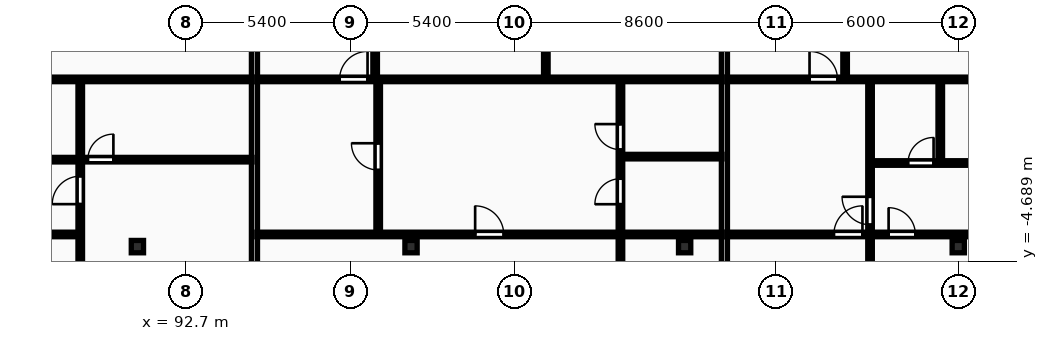
"""IFC4 building model, lengths in metres.
Left out: names, types, materials, properties, quantities, classifications, styles, units other than length and angle.
Written with IfcOpenShell. Run it as: python <this file> out.ifc"""

import sys

from ifc_helpers import new_model, si_unit, direction, frame, frame_2d, origin, origin_2d, place, context, subcontext, project, spatial, rectangle, i_section, extrude, element, fill, save


model = new_model("IFC4")
c1 = context("Model", 3, precision=1e-05, world=origin(), true_north=direction((0.0, 1.0)))
c2 = subcontext(c1, "Body", "Model", "MODEL_VIEW")
j1 = project(units=[si_unit("LENGTHUNIT", "METRE"), si_unit("PLANEANGLEUNIT", "RADIAN")], contexts=[c1])
p1 = place(None, origin())
s1 = spatial("IfcSite", under=j1, at=p1, CompositionType="ELEMENT")
p2 = place(p1, origin())
s2 = spatial("IfcBuilding", under=s1, at=p2, CompositionType="ELEMENT")
p3 = place(p2, frame((0.0, 0.0, 139.3)))
s3 = spatial("IfcBuildingStorey", under=s2, at=p3, CompositionType="ELEMENT", Elevation=139.3)
for number, where, z_axis, x_axis in (
    (1, (91.1, -4.2, 0.0), (0.0, 0.0, 1.0), (1.0, 0.0, 0.0)),
    (2, (100.1, -4.2, 0.0), (0.0, 0.0, 1.0), (1.0, 0.0, 0.0)),
    (3, (109.1, -4.2, 0.0), (0.0, 0.0, 1.0), (1.0, 0.0, 0.0)),
    (4, (118.1, -4.2, 0.0), (0.0, 0.0, 1.0), (1.0, 0.0, 0.0)),
):
    element("IfcColumn", number, at=place(p3, frame(where, z_axis=z_axis, x_axis=x_axis)), inside=s3, PredefinedType="COLUMN", context=c2, shape_type="SweptSolid", body=[
        extrude(i_section(OverallWidth=0.403, OverallDepth=0.406, WebThickness=0.027, FlangeThickness=0.043, FilletRadius=0.015, at=origin_2d()), origin(), (0.0, 0.0, 1.0), 3.6),
    ])
p4 = place(p3, frame((94.95, -8.7, 0.0), z_axis=(0.0, 0.0, 1.0), x_axis=(0.0, 1.0, 0.0)))
e5 = element("IfcWall", 5, at=p4, inside=s3, PredefinedType="PARTITIONING", context=c2, shape_type="SweptSolid", body=[
    extrude(rectangle(XDim=24.57, YDim=0.2, at=frame_2d((12.285, 0.0))), origin(), (0.0, 0.0, 1.0), 3.31),
])
p5 = place(p3, frame((89.22, -1.32, 0.0), z_axis=(0.0, 0.0, 1.0), x_axis=(0.0, 1.0, 0.0)))
e6 = element("IfcWall", 6, at=p5, inside=s3, PredefinedType="PARTITIONING", context=c2, shape_type="SweptSolid", body=[
    extrude(rectangle(XDim=2.58, YDim=0.15, at=frame_2d((1.29, 0.0))), origin(), (0.0, 0.0, 1.0), 3.31),
])
p6 = place(p3, frame((89.22, -8.7, 0.0), z_axis=(0.0, 0.0, 1.0), x_axis=(0.0, 1.0, 0.0)))
e7 = element("IfcWall", 7, at=p6, inside=s3, PredefinedType="PARTITIONING", context=c2, shape_type="SweptSolid", body=[
    extrude(rectangle(XDim=7.34, YDim=0.15, at=frame_2d((3.67, 0.0))), origin(), (0.0, 0.0, 1.0), 3.31),
])
p7 = place(p6, frame((5.897, 0.0, 0.0)))
e8 = element("IfcOpeningElement", 8, at=p7, cuts=e7, PredefinedType="OPENING", context=c2, shape_type="SweptSolid", body=[
    extrude(rectangle(XDim=0.92, YDim=2.08, at=frame_2d((0.46, 1.04))), frame((0.0, 0.085, 0.0), z_axis=(0.0, -1.0, 0.0), x_axis=(1.0, 0.0, 0.0)), (0.0, 0.0, 1.0), 0.17),
])
p8 = place(p3, frame((77.11, -1.34, 0.0), z_axis=(0.0, 0.0, 1.0), x_axis=(1.0, 0.0, 0.0)))
e9 = element("IfcWall", 9, at=p8, inside=s3, PredefinedType="PARTITIONING", context=c2, shape_type="SweptSolid", body=[
    extrude(rectangle(XDim=17.76, YDim=0.15, at=frame_2d((8.88, 0.0))), origin(), (0.0, 0.0, 1.0), 3.31),
])
p9 = place(p8, frame((1.191, 0.0, 0.0)))
e10 = element("IfcOpeningElement", 10, at=p9, cuts=e9, PredefinedType="OPENING", context=c2, shape_type="SweptSolid", body=[
    extrude(rectangle(XDim=0.84, YDim=2.04, at=frame_2d((0.42, 1.02))), frame((0.0, 0.085, 0.0), z_axis=(0.0, -1.0, 0.0), x_axis=(1.0, 0.0, 0.0)), (0.0, 0.0, 1.0), 0.17),
])
p10 = place(p8, frame((8.46, 0.0, 0.0)))
e11 = element("IfcOpeningElement", 11, at=p10, cuts=e9, PredefinedType="OPENING", context=c2, shape_type="SweptSolid", body=[
    extrude(rectangle(XDim=0.84, YDim=2.04, at=frame_2d((0.42, 1.02))), frame((0.0, 0.085, 0.0), z_axis=(0.0, -1.0, 0.0), x_axis=(1.0, 0.0, 0.0)), (0.0, 0.0, 1.0), 0.17),
])
p11 = place(p8, frame((12.36, 0.0, 0.0)))
e12 = element("IfcOpeningElement", 12, at=p11, cuts=e9, PredefinedType="OPENING", context=c2, shape_type="SweptSolid", body=[
    extrude(rectangle(XDim=0.84, YDim=2.04, at=frame_2d((0.42, 1.02))), frame((0.0, 0.085, 0.0), z_axis=(0.0, -1.0, 0.0), x_axis=(1.0, 0.0, 0.0)), (0.0, 0.0, 1.0), 0.17),
])
p12 = place(p3, frame((72.78, 1.3, 0.0), z_axis=(0.0, 0.0, 1.0), x_axis=(1.0, 0.0, 0.0)))
e13 = element("IfcWall", 13, at=p12, inside=s3, PredefinedType="PARTITIONING", context=c2, shape_type="SweptSolid", body=[
    extrude(rectangle(XDim=22.09, YDim=0.15, at=frame_2d((11.045, 0.0))), origin(), (0.0, 0.0, 1.0), 3.31),
])
p13 = place(p12, frame((2.72, 0.0, 0.0)))
e14 = element("IfcOpeningElement", 14, at=p13, cuts=e13, PredefinedType="OPENING", context=c2, shape_type="SweptSolid", body=[
    extrude(rectangle(XDim=0.92, YDim=2.08, at=frame_2d((0.46, 1.04))), frame((0.0, 0.085, 0.0), z_axis=(0.0, -1.0, 0.0), x_axis=(1.0, 0.0, 0.0)), (0.0, 0.0, 1.0), 0.17),
])
p14 = place(p3, frame((72.78, -3.8, 0.0), z_axis=(0.0, 0.0, 1.0), x_axis=(1.0, 0.0, 0.0)))
e15 = element("IfcWall", 15, at=p14, inside=s3, PredefinedType="PARTITIONING", context=c2, shape_type="SweptSolid", body=[
    extrude(rectangle(XDim=16.44, YDim=0.15, at=frame_2d((8.22, 0.0))), origin(), (0.0, 0.0, 1.0), 3.31),
])
p15 = place(p14, frame((3.1, 0.0, 0.0)))
e16 = element("IfcOpeningElement", 16, at=p15, cuts=e15, PredefinedType="OPENING", context=c2, shape_type="SweptSolid", body=[
    extrude(rectangle(XDim=0.94, YDim=2.1, at=frame_2d((0.47, 1.05))), frame((0.0, 0.085, 0.0), z_axis=(0.0, -1.0, 0.0), x_axis=(1.0, 0.0, 0.0)), (0.0, 0.0, 1.0), 0.17),
])
p16 = place(p14, frame((6.969, 0.0, 0.0)))
e17 = element("IfcOpeningElement", 17, at=p16, cuts=e15, PredefinedType="OPENING", context=c2, shape_type="SweptSolid", body=[
    extrude(rectangle(XDim=0.88, YDim=2.06, at=frame_2d((0.44, 1.03))), frame((0.0, 0.085, 0.0), z_axis=(0.0, -1.0, 0.0), x_axis=(1.0, 0.0, 0.0)), (0.0, 0.0, 1.0), 0.17),
])
p17 = place(p14, frame((11.498, 0.0, 0.0)))
e18 = element("IfcOpeningElement", 18, at=p17, cuts=e15, PredefinedType="OPENING", context=c2, shape_type="SweptSolid", body=[
    extrude(rectangle(XDim=0.88, YDim=2.06, at=frame_2d((0.44, 1.03))), frame((0.0, 0.085, 0.0), z_axis=(0.0, -1.0, 0.0), x_axis=(1.0, 0.0, 0.0)), (0.0, 0.0, 1.0), 0.17),
])
p18 = place(p3, frame((110.408, -8.7, 0.0), z_axis=(0.0, 0.0, 1.0), x_axis=(0.0, 1.0, 0.0)))
e19 = element("IfcWall", 19, at=p18, inside=s3, PredefinedType="PARTITIONING", context=c2, shape_type="SweptSolid", body=[
    extrude(rectangle(XDim=24.57, YDim=0.2, at=frame_2d((12.285, 0.0))), origin(), (0.0, 0.0, 1.0), 3.31),
])
p19 = place(p3, frame((104.534, 1.34, 0.0), z_axis=(0.0, 0.0, 1.0), x_axis=(0.0, 1.0, 0.0)))
e20 = element("IfcWall", 20, at=p19, inside=s3, PredefinedType="PARTITIONING", context=c2, shape_type="SweptSolid", body=[
    extrude(rectangle(XDim=7.455, YDim=0.15, at=frame_2d((3.728, 0.0))), origin(), (0.0, 0.0, 1.0), 3.31),
])
p20 = place(p19, frame((3.308, 0.0, 0.0)))
e21 = element("IfcOpeningElement", 21, at=p20, cuts=e20, PredefinedType="OPENING", context=c2, shape_type="SweptSolid", body=[
    extrude(rectangle(XDim=0.84, YDim=2.04, at=frame_2d((0.42, 1.02))), frame((0.0, 0.085, 0.0), z_axis=(0.0, -1.0, 0.0), x_axis=(1.0, 0.0, 0.0)), (0.0, 0.0, 1.0), 0.17),
])
p21 = place(p3, frame((98.92, 1.34, 0.0), z_axis=(0.0, 0.0, 1.0), x_axis=(0.0, 1.0, 0.0)))
e22 = element("IfcWall", 22, at=p21, inside=s3, PredefinedType="PARTITIONING", context=c2, shape_type="SweptSolid", body=[
    extrude(rectangle(XDim=14.55, YDim=0.15, at=frame_2d((7.275, 0.0))), origin(), (0.0, 0.0, 1.0), 3.31),
])
p22 = place(p21, frame((3.098, 0.0, 0.0)))
e23 = element("IfcOpeningElement", 23, at=p22, cuts=e22, PredefinedType="OPENING", context=c2, shape_type="SweptSolid", body=[
    extrude(rectangle(XDim=0.88, YDim=2.06, at=frame_2d((0.44, 1.03))), frame((0.0, 0.085, 0.0), z_axis=(0.0, -1.0, 0.0), x_axis=(1.0, 0.0, 0.0)), (0.0, 0.0, 1.0), 0.17),
])
p23 = place(p3, frame((99.02, -3.74, 0.0), z_axis=(0.0, 0.0, 1.0), x_axis=(0.0, 1.0, 0.0)))
e24 = element("IfcWall", 24, at=p23, inside=s3, PredefinedType="PARTITIONING", context=c2, shape_type="SweptSolid", body=[
    extrude(rectangle(XDim=5.0, YDim=0.15, at=frame_2d((2.5, 0.0))), origin(), (0.0, 0.0, 1.0), 3.31),
])
p24 = place(p23, frame((2.06, 0.0, 0.0)))
e25 = element("IfcOpeningElement", 25, at=p24, cuts=e24, PredefinedType="OPENING", context=c2, shape_type="SweptSolid", body=[
    extrude(rectangle(XDim=0.88, YDim=2.06, at=frame_2d((0.44, 1.03))), frame((0.0, 0.085, 0.0), z_axis=(0.0, -1.0, 0.0), x_axis=(1.0, 0.0, 0.0)), (0.0, 0.0, 1.0), 0.17),
])
p25 = place(p3, frame((107.048, -1.24, 0.0), z_axis=(0.0, 0.0, 1.0), x_axis=(1.0, 0.0, 0.0)))
e26 = element("IfcWall", 26, at=p25, inside=s3, PredefinedType="PARTITIONING", context=c2, shape_type="SweptSolid", body=[
    extrude(rectangle(XDim=3.28, YDim=0.15, at=frame_2d((1.64, 0.0))), origin(), (0.0, 0.0, 1.0), 3.31),
])
p26 = place(p3, frame((106.988, -8.7, 0.0), z_axis=(0.0, 0.0, 1.0), x_axis=(0.0, 1.0, 0.0)))
e27 = element("IfcWall", 27, at=p26, inside=s3, PredefinedType="PARTITIONING", context=c2, shape_type="SweptSolid", body=[
    extrude(rectangle(XDim=9.96, YDim=0.15, at=frame_2d((4.98, 0.0))), origin(), (0.0, 0.0, 1.0), 3.31),
])
p27 = place(p26, frame((5.894, 0.0, 0.0)))
e28 = element("IfcOpeningElement", 28, at=p27, cuts=e27, PredefinedType="OPENING", context=c2, shape_type="SweptSolid", body=[
    extrude(rectangle(XDim=0.84, YDim=2.04, at=frame_2d((0.42, 1.02))), frame((0.0, 0.085, 0.0), z_axis=(0.0, -1.0, 0.0), x_axis=(1.0, 0.0, 0.0)), (0.0, 0.0, 1.0), 0.17),
])
p28 = place(p26, frame((7.69, 0.0, 0.0)))
e29 = element("IfcOpeningElement", 29, at=p28, cuts=e27, PredefinedType="OPENING", context=c2, shape_type="SweptSolid", body=[
    extrude(rectangle(XDim=0.84, YDim=2.04, at=frame_2d((0.42, 1.02))), frame((0.0, 0.085, 0.0), z_axis=(0.0, -1.0, 0.0), x_axis=(1.0, 0.0, 0.0)), (0.0, 0.0, 1.0), 0.17),
])
p29 = place(p26, frame((2.223, 0.0, 0.0)))
e30 = element("IfcOpeningElement", 30, at=p29, cuts=e27, PredefinedType="OPENING", context=c2, shape_type="SweptSolid", body=[
    extrude(rectangle(XDim=0.88, YDim=2.06, at=frame_2d((0.44, 1.03))), frame((0.0, 0.085, 0.0), z_axis=(0.0, -1.0, 0.0), x_axis=(1.0, 0.0, 0.0)), (0.0, 0.0, 1.0), 0.17),
])
p30 = place(p3, frame((95.03, 1.3, 0.0), z_axis=(0.0, 0.0, 1.0), x_axis=(1.0, 0.0, 0.0)))
e31 = element("IfcWall", 31, at=p30, inside=s3, PredefinedType="PARTITIONING", context=c2, shape_type="SweptSolid", body=[
    extrude(rectangle(XDim=15.298, YDim=0.15, at=frame_2d((7.649, 0.0))), origin(), (0.0, 0.0, 1.0), 3.31),
])
p31 = place(p30, frame((2.72, 0.0, 0.0)))
e32 = element("IfcOpeningElement", 32, at=p31, cuts=e31, PredefinedType="OPENING", context=c2, shape_type="SweptSolid", body=[
    extrude(rectangle(XDim=0.92, YDim=2.08, at=frame_2d((0.46, 1.04))), frame((0.0, 0.085, 0.0), z_axis=(0.0, -1.0, 0.0), x_axis=(1.0, 0.0, 0.0)), (0.0, 0.0, 1.0), 0.17),
])
p32 = place(p3, frame((95.03, -3.8, 0.0), z_axis=(0.0, 0.0, 1.0), x_axis=(1.0, 0.0, 0.0)))
e33 = element("IfcWall", 33, at=p32, inside=s3, PredefinedType="PARTITIONING", context=c2, shape_type="SweptSolid", body=[
    extrude(rectangle(XDim=15.298, YDim=0.15, at=frame_2d((7.649, 0.0))), origin(), (0.0, 0.0, 1.0), 3.31),
])
p33 = place(p32, frame((7.179, 0.0, 0.0)))
e34 = element("IfcOpeningElement", 34, at=p33, cuts=e33, PredefinedType="OPENING", context=c2, shape_type="SweptSolid", body=[
    extrude(rectangle(XDim=0.94, YDim=2.1, at=frame_2d((0.47, 1.05))), frame((0.0, 0.085, 0.0), z_axis=(0.0, -1.0, 0.0), x_axis=(1.0, 0.0, 0.0)), (0.0, 0.0, 1.0), 0.17),
])
p34 = place(p3, frame((114.378, 1.34, 0.0), z_axis=(0.0, 0.0, 1.0), x_axis=(0.0, 1.0, 0.0)))
e35 = element("IfcWall", 35, at=p34, inside=s3, PredefinedType="PARTITIONING", context=c2, shape_type="SweptSolid", body=[
    extrude(rectangle(XDim=14.55, YDim=0.15, at=frame_2d((7.275, 0.0))), origin(), (0.0, 0.0, 1.0), 3.31),
])
p35 = place(p34, frame((5.965, 0.0, 0.0)))
e36 = element("IfcOpeningElement", 36, at=p35, cuts=e35, PredefinedType="OPENING", context=c2, shape_type="SweptSolid", body=[
    extrude(rectangle(XDim=0.88, YDim=2.06, at=frame_2d((0.44, 1.03))), frame((0.0, 0.085, 0.0), z_axis=(0.0, -1.0, 0.0), x_axis=(1.0, 0.0, 0.0)), (0.0, 0.0, 1.0), 0.17),
])
p36 = place(p3, frame((117.508, -1.43, 0.0), z_axis=(0.0, 0.0, 1.0), x_axis=(0.0, 1.0, 0.0)))
e37 = element("IfcWall", 37, at=p36, inside=s3, PredefinedType="PARTITIONING", context=c2, shape_type="SweptSolid", body=[
    extrude(rectangle(XDim=2.69, YDim=0.15, at=frame_2d((1.345, 0.0))), origin(), (0.0, 0.0, 1.0), 3.31),
])
p37 = place(p3, frame((115.198, -8.7, 0.0), z_axis=(0.0, 0.0, 1.0), x_axis=(0.0, 1.0, 0.0)))
e38 = element("IfcWall", 38, at=p37, inside=s3, PredefinedType="PARTITIONING", context=c2, shape_type="SweptSolid", body=[
    extrude(rectangle(XDim=9.96, YDim=0.15, at=frame_2d((4.98, 0.0))), origin(), (0.0, 0.0, 1.0), 3.31),
])
p38 = place(p37, frame((5.22, 0.0, 0.0)))
e39 = element("IfcOpeningElement", 39, at=p38, cuts=e38, PredefinedType="OPENING", context=c2, shape_type="SweptSolid", body=[
    extrude(rectangle(XDim=0.92, YDim=2.08, at=frame_2d((0.46, 1.04))), frame((0.0, 0.085, 0.0), z_axis=(0.0, -1.0, 0.0), x_axis=(1.0, 0.0, 0.0)), (0.0, 0.0, 1.0), 0.17),
])
p39 = place(p3, frame((115.238, -1.45, 0.0), z_axis=(0.0, 0.0, 1.0), x_axis=(1.0, 0.0, 0.0)))
e40 = element("IfcWall", 40, at=p39, inside=s3, PredefinedType="PARTITIONING", context=c2, shape_type="SweptSolid", body=[
    extrude(rectangle(XDim=15.382, YDim=0.15, at=frame_2d((7.691, 0.0))), origin(), (0.0, 0.0, 1.0), 3.31),
])
p40 = place(p39, frame((1.21, 0.0, 0.0)))
e41 = element("IfcOpeningElement", 41, at=p40, cuts=e40, PredefinedType="OPENING", context=c2, shape_type="SweptSolid", body=[
    extrude(rectangle(XDim=0.84, YDim=2.04, at=frame_2d((0.42, 1.02))), frame((0.0, 0.085, 0.0), z_axis=(0.0, -1.0, 0.0), x_axis=(1.0, 0.0, 0.0)), (0.0, 0.0, 1.0), 0.17),
])
p41 = place(p39, frame((7.271, 0.0, 0.0)))
e42 = element("IfcOpeningElement", 42, at=p41, cuts=e40, PredefinedType="OPENING", context=c2, shape_type="SweptSolid", body=[
    extrude(rectangle(XDim=0.84, YDim=2.04, at=frame_2d((0.42, 1.02))), frame((0.0, 0.085, 0.0), z_axis=(0.0, -1.0, 0.0), x_axis=(1.0, 0.0, 0.0)), (0.0, 0.0, 1.0), 0.17),
])
p42 = place(p39, frame((11.162, 0.0, 0.0)))
e43 = element("IfcOpeningElement", 43, at=p42, cuts=e40, PredefinedType="OPENING", context=c2, shape_type="SweptSolid", body=[
    extrude(rectangle(XDim=0.84, YDim=2.04, at=frame_2d((0.42, 1.02))), frame((0.0, 0.085, 0.0), z_axis=(0.0, -1.0, 0.0), x_axis=(1.0, 0.0, 0.0)), (0.0, 0.0, 1.0), 0.17),
])
p43 = place(p3, frame((110.488, 1.3, 0.0), z_axis=(0.0, 0.0, 1.0), x_axis=(1.0, 0.0, 0.0)))
e44 = element("IfcWall", 44, at=p43, inside=s3, PredefinedType="PARTITIONING", context=c2, shape_type="SweptSolid", body=[
    extrude(rectangle(XDim=20.132, YDim=0.15, at=frame_2d((10.066, 0.0))), origin(), (0.0, 0.0, 1.0), 3.31),
])
p44 = place(p43, frame((2.72, 0.0, 0.0)))
e45 = element("IfcOpeningElement", 45, at=p44, cuts=e44, PredefinedType="OPENING", context=c2, shape_type="SweptSolid", body=[
    extrude(rectangle(XDim=0.92, YDim=2.08, at=frame_2d((0.46, 1.04))), frame((0.0, 0.085, 0.0), z_axis=(0.0, -1.0, 0.0), x_axis=(1.0, 0.0, 0.0)), (0.0, 0.0, 1.0), 0.17),
])
p45 = place(p3, frame((110.488, -3.8, 0.0), z_axis=(0.0, 0.0, 1.0), x_axis=(1.0, 0.0, 0.0)))
e46 = element("IfcWall", 46, at=p45, inside=s3, PredefinedType="PARTITIONING", context=c2, shape_type="SweptSolid", body=[
    extrude(rectangle(XDim=15.662, YDim=0.15, at=frame_2d((7.831, 0.0))), origin(), (0.0, 0.0, 1.0), 3.31),
])
p46 = place(p45, frame((3.52, 0.0, 0.0)))
e47 = element("IfcOpeningElement", 47, at=p46, cuts=e46, PredefinedType="OPENING", context=c2, shape_type="SweptSolid", body=[
    extrude(rectangle(XDim=0.94, YDim=2.1, at=frame_2d((0.47, 1.05))), frame((0.0, 0.085, 0.0), z_axis=(0.0, -1.0, 0.0), x_axis=(1.0, 0.0, 0.0)), (0.0, 0.0, 1.0), 0.17),
])
p47 = place(p45, frame((5.321, 0.0, 0.0)))
e48 = element("IfcOpeningElement", 48, at=p47, cuts=e46, PredefinedType="OPENING", context=c2, shape_type="SweptSolid", body=[
    extrude(rectangle(XDim=0.88, YDim=2.06, at=frame_2d((0.44, 1.03))), frame((0.0, 0.085, 0.0), z_axis=(0.0, -1.0, 0.0), x_axis=(1.0, 0.0, 0.0)), (0.0, 0.0, 1.0), 0.17),
])
p48 = place(p45, frame((10.244, 0.0, 0.0)))
e49 = element("IfcOpeningElement", 49, at=p48, cuts=e46, PredefinedType="OPENING", context=c2, shape_type="SweptSolid", body=[
    extrude(rectangle(XDim=0.88, YDim=2.06, at=frame_2d((0.44, 1.03))), frame((0.0, 0.085, 0.0), z_axis=(0.0, -1.0, 0.0), x_axis=(1.0, 0.0, 0.0)), (0.0, 0.0, 1.0), 0.17),
])
p49 = place(p7, origin())
e50 = element("IfcDoor", 50, at=p49, inside=s3, OperationType="SINGLE_SWING_LEFT", PredefinedType="DOOR", context=c2, shape_type="SweptSolid", body=[
    extrude(rectangle(XDim=0.92, YDim=2.08, at=frame_2d((0.46, 1.04))), frame((0.0, 0.025, 0.0), z_axis=(0.0, -1.0, 0.0), x_axis=(1.0, 0.0, 0.0)), (0.0, 0.0, 1.0), 0.05),
])
fill(e8, e50)
p50 = place(p11, origin())
e51 = element("IfcDoor", 51, at=p50, inside=s3, OperationType="SINGLE_SWING_RIGHT", PredefinedType="DOOR", context=c2, shape_type="SweptSolid", body=[
    extrude(rectangle(XDim=0.84, YDim=2.04, at=frame_2d((0.42, 1.02))), frame((0.0, 0.025, 0.0), z_axis=(0.0, -1.0, 0.0), x_axis=(1.0, 0.0, 0.0)), (0.0, 0.0, 1.0), 0.05),
])
fill(e12, e51)
p51 = place(p24, origin())
e52 = element("IfcDoor", 52, at=p51, inside=s3, OperationType="SINGLE_SWING_RIGHT", PredefinedType="DOOR", context=c2, shape_type="SweptSolid", body=[
    extrude(rectangle(XDim=0.88, YDim=2.06, at=frame_2d((0.44, 1.03))), frame((0.0, 0.025, 0.0), z_axis=(0.0, -1.0, 0.0), x_axis=(1.0, 0.0, 0.0)), (0.0, 0.0, 1.0), 0.05),
])
fill(e25, e52)
p52 = place(p27, origin())
e53 = element("IfcDoor", 53, at=p52, inside=s3, OperationType="SINGLE_SWING_LEFT", PredefinedType="DOOR", context=c2, shape_type="SweptSolid", body=[
    extrude(rectangle(XDim=0.84, YDim=2.04, at=frame_2d((0.42, 1.02))), frame((0.0, 0.025, 0.0), z_axis=(0.0, -1.0, 0.0), x_axis=(1.0, 0.0, 0.0)), (0.0, 0.0, 1.0), 0.05),
])
fill(e28, e53)
p53 = place(p28, origin())
e54 = element("IfcDoor", 54, at=p53, inside=s3, OperationType="SINGLE_SWING_RIGHT", PredefinedType="DOOR", context=c2, shape_type="SweptSolid", body=[
    extrude(rectangle(XDim=0.84, YDim=2.04, at=frame_2d((0.42, 1.02))), frame((0.0, 0.025, 0.0), z_axis=(0.0, -1.0, 0.0), x_axis=(1.0, 0.0, 0.0)), (0.0, 0.0, 1.0), 0.05),
])
fill(e29, e54)
p54 = place(p31, origin())
e55 = element("IfcDoor", 55, at=p54, inside=s3, OperationType="SINGLE_SWING_RIGHT", PredefinedType="DOOR", context=c2, shape_type="SweptSolid", body=[
    extrude(rectangle(XDim=0.92, YDim=2.08, at=frame_2d((0.46, 1.04))), frame((0.0, 0.025, 0.0), z_axis=(0.0, -1.0, 0.0), x_axis=(1.0, 0.0, 0.0)), (0.0, 0.0, 1.0), 0.05),
])
fill(e32, e55)
p55 = place(p33, origin())
e56 = element("IfcDoor", 56, at=p55, inside=s3, OperationType="SINGLE_SWING_LEFT", PredefinedType="DOOR", context=c2, shape_type="SweptSolid", body=[
    extrude(rectangle(XDim=0.94, YDim=2.1, at=frame_2d((0.47, 1.05))), frame((0.0, 0.025, 0.0), z_axis=(0.0, -1.0, 0.0), x_axis=(1.0, 0.0, 0.0)), (0.0, 0.0, 1.0), 0.05),
])
fill(e34, e56)
p56 = place(p38, origin())
e57 = element("IfcDoor", 57, at=p56, inside=s3, OperationType="SINGLE_SWING_RIGHT", PredefinedType="DOOR", context=c2, shape_type="SweptSolid", body=[
    extrude(rectangle(XDim=0.92, YDim=2.08, at=frame_2d((0.46, 1.04))), frame((0.0, 0.025, 0.0), z_axis=(0.0, -1.0, 0.0), x_axis=(1.0, 0.0, 0.0)), (0.0, 0.0, 1.0), 0.05),
])
fill(e39, e57)
p57 = place(p40, origin())
e58 = element("IfcDoor", 58, at=p57, inside=s3, OperationType="SINGLE_SWING_RIGHT", PredefinedType="DOOR", context=c2, shape_type="SweptSolid", body=[
    extrude(rectangle(XDim=0.84, YDim=2.04, at=frame_2d((0.42, 1.02))), frame((0.0, 0.025, 0.0), z_axis=(0.0, -1.0, 0.0), x_axis=(1.0, 0.0, 0.0)), (0.0, 0.0, 1.0), 0.05),
])
fill(e41, e58)
p58 = place(p44, origin())
e59 = element("IfcDoor", 59, at=p58, inside=s3, OperationType="SINGLE_SWING_LEFT", PredefinedType="DOOR", context=c2, shape_type="SweptSolid", body=[
    extrude(rectangle(XDim=0.92, YDim=2.08, at=frame_2d((0.46, 1.04))), frame((0.0, 0.025, 0.0), z_axis=(0.0, -1.0, 0.0), x_axis=(1.0, 0.0, 0.0)), (0.0, 0.0, 1.0), 0.05),
])
fill(e45, e59)
p59 = place(p46, origin())
e60 = element("IfcDoor", 60, at=p59, inside=s3, OperationType="SINGLE_SWING_RIGHT", PredefinedType="DOOR", context=c2, shape_type="SweptSolid", body=[
    extrude(rectangle(XDim=0.94, YDim=2.1, at=frame_2d((0.47, 1.05))), frame((0.0, 0.025, 0.0), z_axis=(0.0, -1.0, 0.0), x_axis=(1.0, 0.0, 0.0)), (0.0, 0.0, 1.0), 0.05),
])
fill(e47, e60)
p60 = place(p47, origin())
e61 = element("IfcDoor", 61, at=p60, inside=s3, OperationType="SINGLE_SWING_LEFT", PredefinedType="DOOR", context=c2, shape_type="SweptSolid", body=[
    extrude(rectangle(XDim=0.88, YDim=2.06, at=frame_2d((0.44, 1.03))), frame((0.0, 0.025, 0.0), z_axis=(0.0, -1.0, 0.0), x_axis=(1.0, 0.0, 0.0)), (0.0, 0.0, 1.0), 0.05),
])
fill(e48, e61)
save(model, sys.argv[1])
